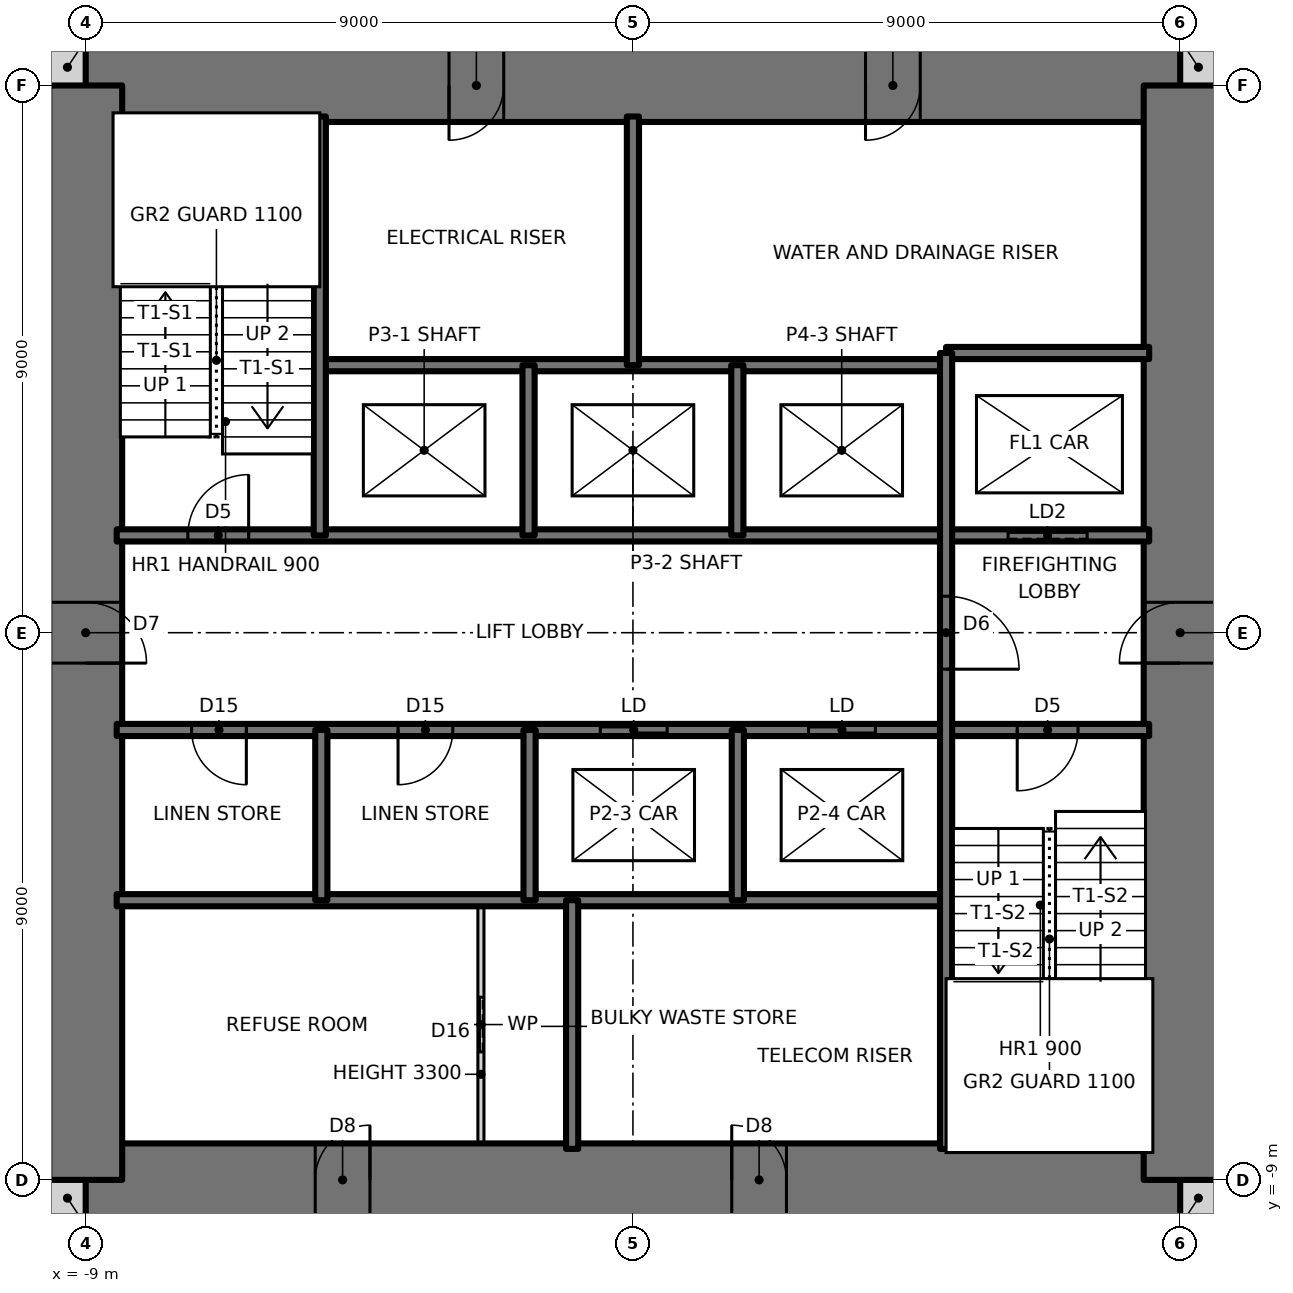
"""IFC4 building model, lengths in metres.
Left out: names, types, materials, properties, quantities, classifications, styles, units other than length and angle.
Written with IfcOpenShell. Run it as: python <this file> out.ifc"""

import sys

from ifc_helpers import new_model, si_unit, direction, frame, frame_2d, origin, place, context, subcontext, project, spatial, rectangle, extrude, element, fill, save


model = new_model("IFC4")
c1 = context("Model", 3, precision=1e-05, world=origin(), true_north=direction((0.0, 1.0)))
c2 = subcontext(c1, "Body", "Model", "MODEL_VIEW")
j1 = project(units=[si_unit("LENGTHUNIT", "METRE"), si_unit("PLANEANGLEUNIT", "RADIAN")], contexts=[c1])
p1 = place(None, origin())
s1 = spatial("IfcSite", under=j1, at=p1, CompositionType="ELEMENT")
p2 = place(p1, origin())
s2 = spatial("IfcBuilding", under=s1, at=p2, CompositionType="ELEMENT")
p3 = place(p2, frame((0.0, 0.0, 129.5)))
s3 = spatial("IfcBuildingStorey", under=s2, at=p3, CompositionType="ELEMENT", Elevation=129.5)
for number, where, z_axis, x_axis in (
    (1, (-9.6, -9.3, 0.0), (0.0, 0.0, 1.0), (1.0, 0.0, 0.0)),
    (2, (9.0, -9.3, 0.0), (0.0, 0.0, 1.0), (1.0, 0.0, 0.0)),
    (3, (9.0, 9.3, 0.0), (0.0, 0.0, 1.0), (1.0, 0.0, 0.0)),
    (4, (-9.6, 9.3, 0.0), (0.0, 0.0, 1.0), (1.0, 0.0, 0.0)),
):
    element("IfcWall", number, at=place(p3, frame(where, z_axis=z_axis, x_axis=x_axis)), inside=s3, PredefinedType="SOLIDWALL", context=c2, shape_type="SweptSolid", body=[
        extrude(rectangle(XDim=0.6, YDim=0.6, at=frame_2d((0.3, 0.0))), origin(), (0.0, 0.0, 1.0), 3.5),
    ])
p4 = place(p3, frame((-9.0, -9.0, 0.0), z_axis=(0.0, 0.0, 1.0), x_axis=(1.0, 0.0, 0.0)))
e5 = element("IfcWall", 5, at=p4, inside=s3, PredefinedType="SHEAR", context=c2, shape_type="SweptSolid", body=[
    extrude(rectangle(XDim=18.0, YDim=1.2, at=frame_2d((9.0, 0.0))), origin(), (0.0, 0.0, 1.0), 3.5),
])
p5 = place(p4, frame((3.775, 0.0, 0.0)))
e6 = element("IfcOpeningElement", 6, at=p5, cuts=e5, PredefinedType="OPENING", context=c2, shape_type="SweptSolid", body=[
    extrude(rectangle(XDim=0.9, YDim=2.1, at=frame_2d((0.45, 1.05))), frame((0.0, 0.61, 0.0), z_axis=(0.0, -1.0, 0.0), x_axis=(1.0, 0.0, 0.0)), (0.0, 0.0, 1.0), 1.22),
])
p6 = place(p4, frame((10.625, 0.0, 0.0)))
e7 = element("IfcOpeningElement", 7, at=p6, cuts=e5, PredefinedType="OPENING", context=c2, shape_type="SweptSolid", body=[
    extrude(rectangle(XDim=0.9, YDim=2.1, at=frame_2d((0.45, 1.05))), frame((0.0, 0.61, 0.0), z_axis=(0.0, -1.0, 0.0), x_axis=(1.0, 0.0, 0.0)), (0.0, 0.0, 1.0), 1.22),
])
p7 = place(p3, frame((9.0, 9.0, 0.0), z_axis=(0.0, 0.0, 1.0), x_axis=(-1.0, 0.0, 0.0)))
e8 = element("IfcWall", 8, at=p7, inside=s3, PredefinedType="SHEAR", context=c2, shape_type="SweptSolid", body=[
    extrude(rectangle(XDim=18.0, YDim=1.2, at=frame_2d((9.0, 0.0))), origin(), (0.0, 0.0, 1.0), 3.5),
])
p8 = place(p7, frame((11.125, 0.0, 0.0)))
e9 = element("IfcOpeningElement", 9, at=p8, cuts=e8, PredefinedType="OPENING", context=c2, shape_type="SweptSolid", body=[
    extrude(rectangle(XDim=0.9, YDim=2.1, at=frame_2d((0.45, 1.05))), frame((0.0, 0.61, 0.0), z_axis=(0.0, -1.0, 0.0), x_axis=(1.0, 0.0, 0.0)), (0.0, 0.0, 1.0), 1.22),
])
p9 = place(p7, frame((4.275, 0.0, 0.0)))
e10 = element("IfcOpeningElement", 10, at=p9, cuts=e8, PredefinedType="OPENING", context=c2, shape_type="SweptSolid", body=[
    extrude(rectangle(XDim=0.9, YDim=2.1, at=frame_2d((0.45, 1.05))), frame((0.0, 0.61, 0.0), z_axis=(0.0, -1.0, 0.0), x_axis=(1.0, 0.0, 0.0)), (0.0, 0.0, 1.0), 1.22),
])
p10 = place(p3, frame((9.0, -9.0, 0.0), z_axis=(0.0, 0.0, 1.0), x_axis=(0.0, 1.0, 0.0)))
e11 = element("IfcWall", 11, at=p10, inside=s3, PredefinedType="SHEAR", context=c2, shape_type="SweptSolid", body=[
    extrude(rectangle(XDim=18.0, YDim=1.2, at=frame_2d((9.0, 0.0))), origin(), (0.0, 0.0, 1.0), 3.5),
])
p11 = place(p10, frame((8.5, 0.0, 0.0)))
e12 = element("IfcOpeningElement", 12, at=p11, cuts=e11, PredefinedType="OPENING", context=c2, shape_type="SweptSolid", body=[
    extrude(rectangle(XDim=1.0, YDim=2.1, at=frame_2d((0.5, 1.05))), frame((0.0, 0.61, 0.0), z_axis=(0.0, -1.0, 0.0), x_axis=(1.0, 0.0, 0.0)), (0.0, 0.0, 1.0), 1.22),
])
p12 = place(p3, frame((-9.0, 9.0, 0.0), z_axis=(0.0, 0.0, 1.0), x_axis=(0.0, -1.0, 0.0)))
e13 = element("IfcWall", 13, at=p12, inside=s3, PredefinedType="SHEAR", context=c2, shape_type="SweptSolid", body=[
    extrude(rectangle(XDim=18.0, YDim=1.2, at=frame_2d((9.0, 0.0))), origin(), (0.0, 0.0, 1.0), 3.5),
])
p13 = place(p12, frame((8.5, 0.0, 0.0)))
e14 = element("IfcOpeningElement", 14, at=p13, cuts=e13, PredefinedType="OPENING", context=c2, shape_type="SweptSolid", body=[
    extrude(rectangle(XDim=1.0, YDim=2.1, at=frame_2d((0.5, 1.05))), frame((0.0, 0.61, 0.0), z_axis=(0.0, -1.0, 0.0), x_axis=(1.0, 0.0, 0.0)), (0.0, 0.0, 1.0), 1.22),
])
p14 = place(p3, frame((-8.49, -4.4, 0.0), z_axis=(0.0, 0.0, 1.0), x_axis=(1.0, 0.0, 0.0)))
e15 = element("IfcWall", 15, at=p14, inside=s3, PredefinedType="SOLIDWALL", context=c2, shape_type="SweptSolid", body=[
    extrude(rectangle(XDim=13.64, YDim=0.2, at=frame_2d((6.82, 0.0))), origin(), (0.0, 0.0, 1.0), 3.5),
])
p15 = place(p3, frame((-8.49, -1.6, 0.0), z_axis=(0.0, 0.0, 1.0), x_axis=(1.0, 0.0, 0.0)))
e16 = element("IfcWall", 16, at=p15, inside=s3, PredefinedType="SOLIDWALL", context=c2, shape_type="SweptSolid", body=[
    extrude(rectangle(XDim=16.98, YDim=0.2, at=frame_2d((8.49, 0.0))), origin(), (0.0, 0.0, 1.0), 3.5),
])
p16 = place(p15, frame((14.81, 0.0, 0.0)))
e17 = element("IfcOpeningElement", 17, at=p16, cuts=e16, PredefinedType="OPENING", context=c2, shape_type="SweptSolid", body=[
    extrude(rectangle(XDim=1.0, YDim=2.1, at=frame_2d((0.5, 1.05))), frame((0.0, 0.11, 0.0), z_axis=(0.0, -1.0, 0.0), x_axis=(1.0, 0.0, 0.0)), (0.0, 0.0, 1.0), 0.22),
])
p17 = place(p15, frame((1.232, 0.0, 0.0)))
e18 = element("IfcOpeningElement", 18, at=p17, cuts=e16, PredefinedType="OPENING", context=c2, shape_type="SweptSolid", body=[
    extrude(rectangle(XDim=0.9, YDim=2.1, at=frame_2d((0.45, 1.05))), frame((0.0, 0.11, 0.0), z_axis=(0.0, -1.0, 0.0), x_axis=(1.0, 0.0, 0.0)), (0.0, 0.0, 1.0), 0.22),
])
p18 = place(p15, frame((4.627, 0.0, 0.0)))
e19 = element("IfcOpeningElement", 19, at=p18, cuts=e16, PredefinedType="OPENING", context=c2, shape_type="SweptSolid", body=[
    extrude(rectangle(XDim=0.9, YDim=2.1, at=frame_2d((0.45, 1.05))), frame((0.0, 0.11, 0.0), z_axis=(0.0, -1.0, 0.0), x_axis=(1.0, 0.0, 0.0)), (0.0, 0.0, 1.0), 0.22),
])
p19 = place(p15, frame((7.953, 0.0, 0.0)))
e20 = element("IfcOpeningElement", 20, at=p19, cuts=e16, PredefinedType="OPENING", context=c2, shape_type="SweptSolid", body=[
    extrude(rectangle(XDim=1.1, YDim=2.1, at=frame_2d((0.55, 1.05))), frame((0.0, 0.11, 0.0), z_axis=(0.0, -1.0, 0.0), x_axis=(1.0, 0.0, 0.0)), (0.0, 0.0, 1.0), 0.22),
])
p20 = place(p15, frame((11.378, 0.0, 0.0)))
e21 = element("IfcOpeningElement", 21, at=p20, cuts=e16, PredefinedType="OPENING", context=c2, shape_type="SweptSolid", body=[
    extrude(rectangle(XDim=1.1, YDim=2.1, at=frame_2d((0.55, 1.05))), frame((0.0, 0.11, 0.0), z_axis=(0.0, -1.0, 0.0), x_axis=(1.0, 0.0, 0.0)), (0.0, 0.0, 1.0), 0.22),
])
p21 = place(p3, frame((-8.49, 1.6, 0.0), z_axis=(0.0, 0.0, 1.0), x_axis=(1.0, 0.0, 0.0)))
e22 = element("IfcWall", 22, at=p21, inside=s3, PredefinedType="SOLIDWALL", context=c2, shape_type="SweptSolid", body=[
    extrude(rectangle(XDim=16.98, YDim=0.2, at=frame_2d((8.49, 0.0))), origin(), (0.0, 0.0, 1.0), 3.5),
])
p22 = place(p21, frame((1.17, 0.0, 0.0)))
e23 = element("IfcOpeningElement", 23, at=p22, cuts=e22, PredefinedType="OPENING", context=c2, shape_type="SweptSolid", body=[
    extrude(rectangle(XDim=1.0, YDim=2.1, at=frame_2d((0.5, 1.05))), frame((0.0, 0.11, 0.0), z_axis=(0.0, -1.0, 0.0), x_axis=(1.0, 0.0, 0.0)), (0.0, 0.0, 1.0), 0.22),
])
p23 = place(p21, frame((14.66, 0.0, 0.0)))
e24 = element("IfcOpeningElement", 24, at=p23, cuts=e22, PredefinedType="OPENING", context=c2, shape_type="SweptSolid", body=[
    extrude(rectangle(XDim=1.3, YDim=2.1, at=frame_2d((0.65, 1.05))), frame((0.0, 0.11, 0.0), z_axis=(0.0, -1.0, 0.0), x_axis=(1.0, 0.0, 0.0)), (0.0, 0.0, 1.0), 0.22),
])
p24 = place(p3, frame((-5.15, 4.4, 0.0), z_axis=(0.0, 0.0, 1.0), x_axis=(1.0, 0.0, 0.0)))
e25 = element("IfcWall", 25, at=p24, inside=s3, PredefinedType="SOLIDWALL", context=c2, shape_type="SweptSolid", body=[
    extrude(rectangle(XDim=10.3, YDim=0.2, at=frame_2d((5.15, 0.0))), origin(), (0.0, 0.0, 1.0), 3.5),
])
p25 = place(p3, frame((5.15, 4.6, 0.0), z_axis=(0.0, 0.0, 1.0), x_axis=(1.0, 0.0, 0.0)))
e26 = element("IfcWall", 26, at=p25, inside=s3, PredefinedType="SOLIDWALL", context=c2, shape_type="SweptSolid", body=[
    extrude(rectangle(XDim=3.34, YDim=0.2, at=frame_2d((1.67, 0.0))), origin(), (0.0, 0.0, 1.0), 3.5),
])
p26 = place(p3, frame((5.15, -8.49, 0.0), z_axis=(0.0, 0.0, 1.0), x_axis=(0.0, 1.0, 0.0)))
e27 = element("IfcWall", 27, at=p26, inside=s3, PredefinedType="SOLIDWALL", context=c2, shape_type="SweptSolid", body=[
    extrude(rectangle(XDim=13.09, YDim=0.2, at=frame_2d((6.545, 0.0))), origin(), (0.0, 0.0, 1.0), 3.5),
])
p27 = place(p26, frame((7.89, 0.0, 0.0)))
e28 = element("IfcOpeningElement", 28, at=p27, cuts=e27, PredefinedType="OPENING", context=c2, shape_type="SweptSolid", body=[
    extrude(rectangle(XDim=1.2, YDim=2.1, at=frame_2d((0.6, 1.05))), frame((0.0, 0.11, 0.0), z_axis=(0.0, -1.0, 0.0), x_axis=(1.0, 0.0, 0.0)), (0.0, 0.0, 1.0), 0.22),
])
for number, where, z_axis, x_axis in (
    (29, (1.725, -4.4, 0.0), (0.0, 0.0, 1.0), (0.0, 1.0, 0.0)),
    (30, (1.717, 1.6, 0.0), (0.0, 0.0, 1.0), (0.0, 1.0, 0.0)),
):
    element("IfcWall", number, at=place(p3, frame(where, z_axis=z_axis, x_axis=x_axis)), inside=s3, PredefinedType="SOLIDWALL", context=c2, shape_type="SweptSolid", body=[
        extrude(rectangle(XDim=2.8, YDim=0.2, at=frame_2d((1.4, 0.0))), origin(), (0.0, 0.0, 1.0), 3.5),
    ])
for number, where, z_axis, x_axis in (
    (31, (0.0, 4.4, 0.0), (0.0, 0.0, 1.0), (0.0, 1.0, 0.0)),
    (32, (-1.0, -8.49, 0.0), (0.0, 0.0, 1.0), (0.0, 1.0, 0.0)),
):
    element("IfcWall", number, at=place(p3, frame(where, z_axis=z_axis, x_axis=x_axis)), inside=s3, PredefinedType="SOLIDWALL", context=c2, shape_type="SweptSolid", body=[
        extrude(rectangle(XDim=4.09, YDim=0.2, at=frame_2d((2.045, 0.0))), origin(), (0.0, 0.0, 1.0), 3.5),
    ])
for number, where, z_axis, x_axis in (
    (33, (-1.7, -4.4, 0.0), (0.0, 0.0, 1.0), (0.0, 1.0, 0.0)),
    (34, (-1.717, 1.6, 0.0), (0.0, 0.0, 1.0), (0.0, 1.0, 0.0)),
):
    element("IfcWall", number, at=place(p3, frame(where, z_axis=z_axis, x_axis=x_axis)), inside=s3, PredefinedType="SOLIDWALL", context=c2, shape_type="SweptSolid", body=[
        extrude(rectangle(XDim=2.8, YDim=0.2, at=frame_2d((1.4, 0.0))), origin(), (0.0, 0.0, 1.0), 3.5),
    ])
p28 = place(p3, frame((-2.5, -8.49, 0.0), z_axis=(0.0, 0.0, 1.0), x_axis=(0.0, 1.0, 0.0)))
e35 = element("IfcWall", 35, at=p28, inside=s3, PredefinedType="PARTITIONING", context=c2, shape_type="SweptSolid", body=[
    extrude(rectangle(XDim=4.09, YDim=0.1, at=frame_2d((2.045, 0.0))), origin(), (0.0, 0.0, 1.0), 3.3),
])
p29 = place(p28, frame((1.595, 0.0, 0.0)))
e36 = element("IfcOpeningElement", 36, at=p29, cuts=e35, PredefinedType="OPENING", context=c2, shape_type="SweptSolid", body=[
    extrude(rectangle(XDim=0.9, YDim=2.1, at=frame_2d((0.45, 1.05))), frame((0.0, 0.06, 0.0), z_axis=(0.0, -1.0, 0.0), x_axis=(1.0, 0.0, 0.0)), (0.0, 0.0, 1.0), 0.12),
])
p30 = place(p3, frame((-5.125, -4.4, 0.0), z_axis=(0.0, 0.0, 1.0), x_axis=(0.0, 1.0, 0.0)))
e37 = element("IfcWall", 37, at=p30, inside=s3, PredefinedType="SOLIDWALL", context=c2, shape_type="SweptSolid", body=[
    extrude(rectangle(XDim=2.8, YDim=0.2, at=frame_2d((1.4, 0.0))), origin(), (0.0, 0.0, 1.0), 3.5),
])
p31 = place(p3, frame((-5.15, 1.6, 0.0), z_axis=(0.0, 0.0, 1.0), x_axis=(0.0, 1.0, 0.0)))
e38 = element("IfcWall", 38, at=p31, inside=s3, PredefinedType="SOLIDWALL", context=c2, shape_type="SweptSolid", body=[
    extrude(rectangle(XDim=6.89, YDim=0.2, at=frame_2d((3.445, 0.0))), origin(), (0.0, 0.0, 1.0), 3.5),
])
p32 = place(p22, origin())
e39 = element("IfcDoor", 39, at=p32, inside=s3, OperationType="SINGLE_SWING_RIGHT", PredefinedType="DOOR", context=c2, shape_type="SweptSolid", body=[
    extrude(rectangle(XDim=1.0, YDim=2.1, at=frame_2d((0.5, 1.05))), frame((0.0, 0.025, 0.0), z_axis=(0.0, -1.0, 0.0), x_axis=(1.0, 0.0, 0.0)), (0.0, 0.0, 1.0), 0.05),
])
fill(e23, e39)
p33 = place(p16, frame((1.0, 0.0, 0.0), z_axis=(0.0, 0.0, 1.0), x_axis=(-1.0, 0.0, 0.0)))
e40 = element("IfcDoor", 40, at=p33, inside=s3, OperationType="SINGLE_SWING_RIGHT", PredefinedType="DOOR", context=c2, shape_type="SweptSolid", body=[
    extrude(rectangle(XDim=1.0, YDim=2.1, at=frame_2d((0.5, 1.05))), frame((0.0, 0.025, 0.0), z_axis=(0.0, -1.0, 0.0), x_axis=(1.0, 0.0, 0.0)), (0.0, 0.0, 1.0), 0.05),
])
fill(e17, e40)
p34 = place(p27, frame((1.2, 0.0, 0.0), z_axis=(0.0, 0.0, 1.0), x_axis=(-1.0, 0.0, 0.0)))
e41 = element("IfcDoor", 41, at=p34, inside=s3, OperationType="SINGLE_SWING_RIGHT", PredefinedType="DOOR", context=c2, shape_type="SweptSolid", body=[
    extrude(rectangle(XDim=1.2, YDim=2.1, at=frame_2d((0.6, 1.05))), frame((0.0, 0.025, 0.0), z_axis=(0.0, -1.0, 0.0), x_axis=(1.0, 0.0, 0.0)), (0.0, 0.0, 1.0), 0.05),
])
fill(e28, e41)
p35 = place(p17, frame((0.9, 0.0, 0.0), z_axis=(0.0, 0.0, 1.0), x_axis=(-1.0, 0.0, 0.0)))
e42 = element("IfcDoor", 42, at=p35, inside=s3, OperationType="SINGLE_SWING_LEFT", PredefinedType="DOOR", context=c2, shape_type="SweptSolid", body=[
    extrude(rectangle(XDim=0.9, YDim=2.1, at=frame_2d((0.45, 1.05))), frame((0.0, 0.025, 0.0), z_axis=(0.0, -1.0, 0.0), x_axis=(1.0, 0.0, 0.0)), (0.0, 0.0, 1.0), 0.05),
])
fill(e18, e42)
p36 = place(p18, frame((0.9, 0.0, 0.0), z_axis=(0.0, 0.0, 1.0), x_axis=(-1.0, 0.0, 0.0)))
e43 = element("IfcDoor", 43, at=p36, inside=s3, OperationType="SINGLE_SWING_RIGHT", PredefinedType="DOOR", context=c2, shape_type="SweptSolid", body=[
    extrude(rectangle(XDim=0.9, YDim=2.1, at=frame_2d((0.45, 1.05))), frame((0.0, 0.025, 0.0), z_axis=(0.0, -1.0, 0.0), x_axis=(1.0, 0.0, 0.0)), (0.0, 0.0, 1.0), 0.05),
])
fill(e19, e43)
p37 = place(p29, origin())
e44 = element("IfcDoor", 44, at=p37, inside=s3, OperationType="SLIDING_TO_LEFT", PredefinedType="DOOR", context=c2, shape_type="SweptSolid", body=[
    extrude(rectangle(XDim=0.9, YDim=2.1, at=frame_2d((0.45, 1.05))), frame((0.0, 0.025, 0.0), z_axis=(0.0, -1.0, 0.0), x_axis=(1.0, 0.0, 0.0)), (0.0, 0.0, 1.0), 0.05),
])
fill(e36, e44)
p38 = place(p13, origin())
e45 = element("IfcDoor", 45, at=p38, inside=s3, OperationType="SINGLE_SWING_RIGHT", PredefinedType="DOOR", context=c2, shape_type="SweptSolid", body=[
    extrude(rectangle(XDim=1.0, YDim=2.1, at=frame_2d((0.5, 1.05))), frame((0.0, 0.025, 0.0), z_axis=(0.0, -1.0, 0.0), x_axis=(1.0, 0.0, 0.0)), (0.0, 0.0, 1.0), 0.05),
])
fill(e14, e45)
p39 = place(p11, origin())
e46 = element("IfcDoor", 46, at=p39, inside=s3, OperationType="SINGLE_SWING_LEFT", PredefinedType="DOOR", context=c2, shape_type="SweptSolid", body=[
    extrude(rectangle(XDim=1.0, YDim=2.1, at=frame_2d((0.5, 1.05))), frame((0.0, 0.025, 0.0), z_axis=(0.0, -1.0, 0.0), x_axis=(1.0, 0.0, 0.0)), (0.0, 0.0, 1.0), 0.05),
])
fill(e12, e46)
p40 = place(p8, origin())
e47 = element("IfcDoor", 47, at=p40, inside=s3, OperationType="SINGLE_SWING_RIGHT", PredefinedType="DOOR", context=c2, shape_type="SweptSolid", body=[
    extrude(rectangle(XDim=0.9, YDim=2.1, at=frame_2d((0.45, 1.05))), frame((0.0, 0.025, 0.0), z_axis=(0.0, -1.0, 0.0), x_axis=(1.0, 0.0, 0.0)), (0.0, 0.0, 1.0), 0.05),
])
fill(e9, e47)
p41 = place(p9, origin())
e48 = element("IfcDoor", 48, at=p41, inside=s3, OperationType="SINGLE_SWING_RIGHT", PredefinedType="DOOR", context=c2, shape_type="SweptSolid", body=[
    extrude(rectangle(XDim=0.9, YDim=2.1, at=frame_2d((0.45, 1.05))), frame((0.0, 0.025, 0.0), z_axis=(0.0, -1.0, 0.0), x_axis=(1.0, 0.0, 0.0)), (0.0, 0.0, 1.0), 0.05),
])
fill(e10, e48)
p42 = place(p5, origin())
e49 = element("IfcDoor", 49, at=p42, inside=s3, OperationType="SINGLE_SWING_RIGHT", PredefinedType="DOOR", context=c2, shape_type="SweptSolid", body=[
    extrude(rectangle(XDim=0.9, YDim=2.1, at=frame_2d((0.45, 1.05))), frame((0.0, 0.025, 0.0), z_axis=(0.0, -1.0, 0.0), x_axis=(1.0, 0.0, 0.0)), (0.0, 0.0, 1.0), 0.05),
])
fill(e6, e49)
p43 = place(p6, origin())
e50 = element("IfcDoor", 50, at=p43, inside=s3, OperationType="SINGLE_SWING_LEFT", PredefinedType="DOOR", context=c2, shape_type="SweptSolid", body=[
    extrude(rectangle(XDim=0.9, YDim=2.1, at=frame_2d((0.45, 1.05))), frame((0.0, 0.025, 0.0), z_axis=(0.0, -1.0, 0.0), x_axis=(1.0, 0.0, 0.0)), (0.0, 0.0, 1.0), 0.05),
])
fill(e7, e50)
p44 = place(p19, origin())
e51 = element("IfcDoor", 51, at=p44, inside=s3, OperationType="DOUBLE_DOOR_SLIDING", PredefinedType="DOOR", context=c2, shape_type="SweptSolid", body=[
    extrude(rectangle(XDim=1.1, YDim=2.1, at=frame_2d((0.55, 1.05))), frame((0.0, 0.025, 0.0), z_axis=(0.0, -1.0, 0.0), x_axis=(1.0, 0.0, 0.0)), (0.0, 0.0, 1.0), 0.05),
])
fill(e20, e51)
p45 = place(p20, origin())
e52 = element("IfcDoor", 52, at=p45, inside=s3, OperationType="DOUBLE_DOOR_SLIDING", PredefinedType="DOOR", context=c2, shape_type="SweptSolid", body=[
    extrude(rectangle(XDim=1.1, YDim=2.1, at=frame_2d((0.55, 1.05))), frame((0.0, 0.025, 0.0), z_axis=(0.0, -1.0, 0.0), x_axis=(1.0, 0.0, 0.0)), (0.0, 0.0, 1.0), 0.05),
])
fill(e21, e52)
p46 = place(p23, origin())
e53 = element("IfcDoor", 53, at=p46, inside=s3, OperationType="SLIDING_TO_LEFT", PredefinedType="DOOR", context=c2, shape_type="SweptSolid", body=[
    extrude(rectangle(XDim=1.3, YDim=2.1, at=frame_2d((0.65, 1.05))), frame((0.0, 0.025, 0.0), z_axis=(0.0, -1.0, 0.0), x_axis=(1.0, 0.0, 0.0)), (0.0, 0.0, 1.0), 0.05),
])
fill(e24, e53)
save(model, sys.argv[1])
